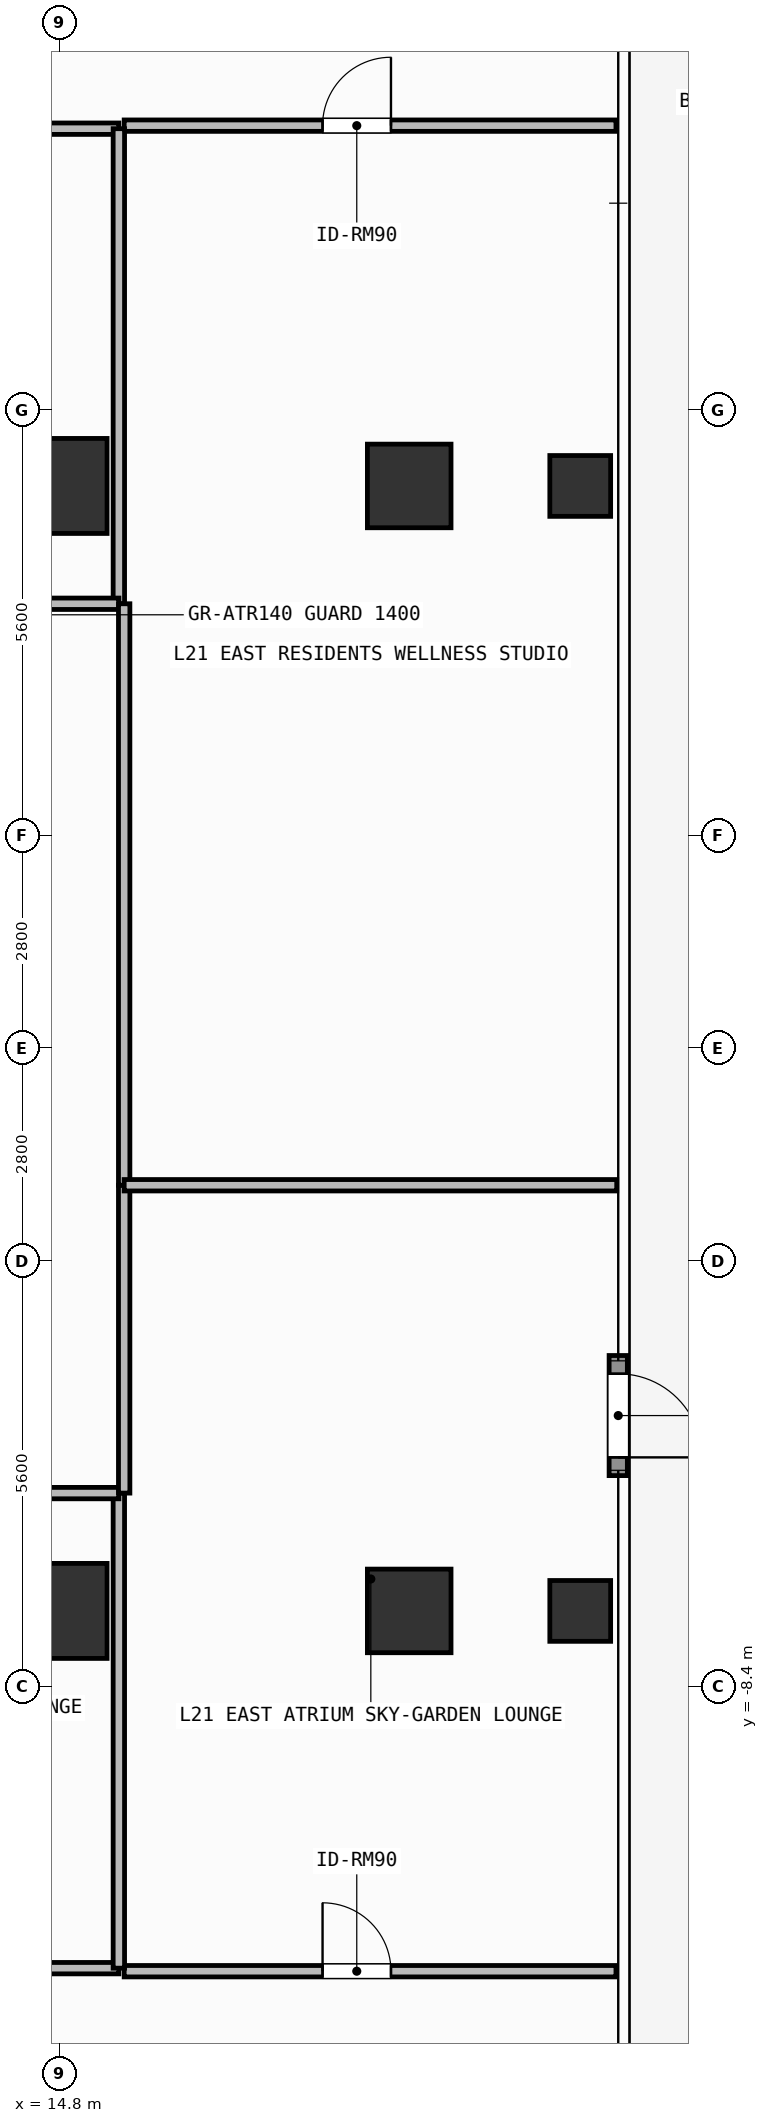
"""IFC4 building model, lengths in metres.
Left out: names, types, materials, properties, quantities, classifications, styles, units other than length and angle.
Written with IfcOpenShell. Run it as: python <this file> out.ifc"""

import sys

from ifc_helpers import new_model, si_unit, direction, frame, frame_2d, origin, origin_2d, place, context, subcontext, project, spatial, rectangle, hollow_rectangle, extrude, element, fill, save


model = new_model("IFC4")
c1 = context("Model", 3, precision=1e-05, world=origin(), true_north=direction((0.0, 1.0)))
c2 = subcontext(c1, "Body", "Model", "MODEL_VIEW")
j1 = project(units=[si_unit("LENGTHUNIT", "METRE"), si_unit("PLANEANGLEUNIT", "RADIAN")], contexts=[c1])
p1 = place(None, origin())
s1 = spatial("IfcSite", under=j1, at=p1, CompositionType="ELEMENT")
p2 = place(p1, origin())
s2 = spatial("IfcBuilding", under=s1, at=p2, CompositionType="ELEMENT")
p3 = place(p2, frame((0.0, 0.0, 85.2)))
s3 = spatial("IfcBuildingStorey", under=s2, at=p3, CompositionType="ELEMENT", Elevation=85.2)
for number, where, z_axis, x_axis in (
    (1, (14.8, -7.4, 0.0), (0.0, 0.0, 1.0), (1.0, 0.0, 0.0)),
    (2, (14.8, 7.4, 0.0), (0.0, 0.0, 1.0), (1.0, 0.0, 0.0)),
):
    element("IfcColumn", number, at=place(p3, frame(where, z_axis=z_axis, x_axis=x_axis)), inside=s3, PredefinedType="COLUMN", context=c2, shape_type="SweptSolid", body=[
        extrude(rectangle(XDim=1.25, YDim=1.25, at=origin_2d()), origin(), (0.0, 0.0, 1.0), 3.9),
    ])
for number, where, z_axis, x_axis in (
    (3, (19.4, -7.4, 0.0), (0.0, 0.0, 1.0), (1.0, 0.0, 0.0)),
    (4, (19.4, 7.4, 0.0), (0.0, 0.0, 1.0), (1.0, 0.0, 0.0)),
):
    element("IfcColumn", number, at=place(p3, frame(where, z_axis=z_axis, x_axis=x_axis)), inside=s3, PredefinedType="COLUMN", context=c2, shape_type="SweptSolid", body=[
        extrude(rectangle(XDim=1.1, YDim=1.1, at=origin_2d()), origin(), (0.0, 0.0, 1.0), 3.9),
    ])
for number, where, z_axis, x_axis in (
    (5, (21.65, -7.4, 0.0), (0.0, 0.0, 1.0), (1.0, 0.0, 0.0)),
    (6, (21.65, 7.4, 0.0), (0.0, 0.0, 1.0), (1.0, 0.0, 0.0)),
):
    element("IfcColumn", number, at=place(p3, frame(where, z_axis=z_axis, x_axis=x_axis)), inside=s3, PredefinedType="COLUMN", context=c2, shape_type="SweptSolid", body=[
        extrude(hollow_rectangle(XDim=0.8, YDim=0.8, WallThickness=0.036, at=origin_2d()), origin(), (0.0, 0.0, 1.0), 3.9),
    ])
p4 = place(p3, frame((22.15, -4.04, 0.0), z_axis=(0.0, 0.0, 1.0), x_axis=(0.0, -1.0, 0.0)))
e7 = element("IfcWall", 7, at=p4, inside=s3, PredefinedType="SOLIDWALL", context=c2, shape_type="SweptSolid", body=[
    extrude(rectangle(XDim=1.58, YDim=0.24, at=frame_2d((0.79, 0.0))), origin(), (0.0, 0.0, 1.0), 3.68),
])
p5 = place(p4, frame((0.24, 0.0, 0.0)))
e8 = element("IfcOpeningElement", 8, at=p5, cuts=e7, PredefinedType="OPENING", context=c2, shape_type="SweptSolid", body=[
    extrude(rectangle(XDim=1.1, YDim=2.2, at=frame_2d((0.55, 1.1))), frame((0.0, 0.13, 0.0), z_axis=(0.0, -1.0, 0.0), x_axis=(1.0, 0.0, 0.0)), (0.0, 0.0, 1.0), 0.26),
])
p6 = place(p3, frame((10.1, -12.1, 0.0), z_axis=(0.0, 0.0, 1.0), x_axis=(1.0, 0.0, 0.0)))
e9 = element("IfcWall", 9, at=p6, inside=s3, PredefinedType="PARTITIONING", context=c2, shape_type="SweptSolid", body=[
    extrude(rectangle(XDim=5.48, YDim=0.15, at=frame_2d((2.74, 0.0))), origin(), (0.0, 0.0, 1.0), 3.68),
])
p7 = place(p6, frame((2.29, 0.0, 0.0)))
e10 = element("IfcOpeningElement", 10, at=p7, cuts=e9, PredefinedType="OPENING", context=c2, shape_type="SweptSolid", body=[
    extrude(rectangle(XDim=0.9, YDim=2.1, at=frame_2d((0.45, 1.05))), frame((0.0, 0.085, 0.0), z_axis=(0.0, -1.0, 0.0), x_axis=(1.0, 0.0, 0.0)), (0.0, 0.0, 1.0), 0.17),
])
p8 = place(p3, frame((8.36, 12.1, 0.0), z_axis=(0.0, 0.0, 1.0), x_axis=(1.0, 0.0, 0.0)))
e11 = element("IfcWall", 11, at=p8, inside=s3, PredefinedType="PARTITIONING", context=c2, shape_type="SweptSolid", body=[
    extrude(rectangle(XDim=7.22, YDim=0.15, at=frame_2d((3.61, 0.0))), origin(), (0.0, 0.0, 1.0), 3.68),
])
p9 = place(p8, frame((3.513, 0.0, 0.0)))
e12 = element("IfcOpeningElement", 12, at=p9, cuts=e11, PredefinedType="OPENING", context=c2, shape_type="SweptSolid", body=[
    extrude(rectangle(XDim=0.9, YDim=2.1, at=frame_2d((0.45, 1.05))), frame((0.0, 0.085, 0.0), z_axis=(0.0, -1.0, 0.0), x_axis=(1.0, 0.0, 0.0)), (0.0, 0.0, 1.0), 0.17),
])
p10 = place(p3, frame((15.65, -12.14, 0.0), z_axis=(0.0, 0.0, 1.0), x_axis=(1.0, 0.0, 0.0)))
e13 = element("IfcWall", 13, at=p10, inside=s3, PredefinedType="PARTITIONING", context=c2, shape_type="SweptSolid", body=[
    extrude(rectangle(XDim=6.47, YDim=0.15, at=frame_2d((3.235, 0.0))), origin(), (0.0, 0.0, 1.0), 3.68),
])
p11 = place(p10, frame((2.61, 0.0, 0.0)))
e14 = element("IfcOpeningElement", 14, at=p11, cuts=e13, PredefinedType="OPENING", context=c2, shape_type="SweptSolid", body=[
    extrude(rectangle(XDim=0.9, YDim=2.1, at=frame_2d((0.45, 1.05))), frame((0.0, 0.085, 0.0), z_axis=(0.0, -1.0, 0.0), x_axis=(1.0, 0.0, 0.0)), (0.0, 0.0, 1.0), 0.17),
])
p12 = place(p3, frame((15.65, 12.14, 0.0), z_axis=(0.0, 0.0, 1.0), x_axis=(1.0, 0.0, 0.0)))
e15 = element("IfcWall", 15, at=p12, inside=s3, PredefinedType="PARTITIONING", context=c2, shape_type="SweptSolid", body=[
    extrude(rectangle(XDim=6.47, YDim=0.15, at=frame_2d((3.235, 0.0))), origin(), (0.0, 0.0, 1.0), 3.68),
])
p13 = place(p12, frame((2.61, 0.0, 0.0)))
e16 = element("IfcOpeningElement", 16, at=p13, cuts=e15, PredefinedType="OPENING", context=c2, shape_type="SweptSolid", body=[
    extrude(rectangle(XDim=0.9, YDim=2.1, at=frame_2d((0.45, 1.05))), frame((0.0, 0.085, 0.0), z_axis=(0.0, -1.0, 0.0), x_axis=(1.0, 0.0, 0.0)), (0.0, 0.0, 1.0), 0.17),
])
p14 = place(p3, frame((15.58, -12.1, 0.0), z_axis=(0.0, 0.0, 1.0), x_axis=(0.0, 1.0, 0.0)))
e17 = element("IfcWall", 17, at=p14, inside=s3, PredefinedType="PARTITIONING", context=c2, shape_type="SweptSolid", body=[
    extrude(rectangle(XDim=6.25, YDim=0.15, at=frame_2d((3.125, 0.0))), origin(), (0.0, 0.0, 1.0), 3.68),
])
p15 = place(p3, frame((8.96, -5.85, 0.0), z_axis=(0.0, 0.0, 1.0), x_axis=(1.0, 0.0, 0.0)))
e18 = element("IfcWall", 18, at=p15, inside=s3, PredefinedType="PARTITIONING", context=c2, shape_type="SweptSolid", body=[
    extrude(rectangle(XDim=6.62, YDim=0.15, at=frame_2d((3.31, 0.0))), origin(), (0.0, 0.0, 1.0), 3.68),
])
p16 = place(p3, frame((15.58, 5.85, 0.0), z_axis=(0.0, 0.0, 1.0), x_axis=(0.0, 1.0, 0.0)))
e19 = element("IfcWall", 19, at=p16, inside=s3, PredefinedType="PARTITIONING", context=c2, shape_type="SweptSolid", body=[
    extrude(rectangle(XDim=6.25, YDim=0.15, at=frame_2d((3.125, 0.0))), origin(), (0.0, 0.0, 1.0), 3.68),
])
p17 = place(p3, frame((8.96, 5.85, 0.0), z_axis=(0.0, 0.0, 1.0), x_axis=(1.0, 0.0, 0.0)))
e20 = element("IfcWall", 20, at=p17, inside=s3, PredefinedType="PARTITIONING", context=c2, shape_type="SweptSolid", body=[
    extrude(rectangle(XDim=6.62, YDim=0.15, at=frame_2d((3.31, 0.0))), origin(), (0.0, 0.0, 1.0), 3.68),
])
p18 = place(p3, frame((15.65, -5.85, 0.0), z_axis=(0.0, 0.0, 1.0), x_axis=(0.0, 1.0, 0.0)))
e21 = element("IfcWall", 21, at=p18, inside=s3, PredefinedType="PARTITIONING", context=c2, shape_type="SweptSolid", body=[
    extrude(rectangle(XDim=4.05, YDim=0.15, at=frame_2d((2.025, 0.0))), origin(), (0.0, 0.0, 1.0), 3.68),
])
p19 = place(p3, frame((15.65, -1.8, 0.0), z_axis=(0.0, 0.0, 1.0), x_axis=(0.0, 1.0, 0.0)))
e22 = element("IfcWall", 22, at=p19, inside=s3, PredefinedType="PARTITIONING", context=c2, shape_type="SweptSolid", body=[
    extrude(rectangle(XDim=7.65, YDim=0.15, at=frame_2d((3.825, 0.0))), origin(), (0.0, 0.0, 1.0), 3.68),
])
p20 = place(p3, frame((15.65, -1.8, 0.0), z_axis=(0.0, 0.0, 1.0), x_axis=(1.0, 0.0, 0.0)))
e23 = element("IfcWall", 23, at=p20, inside=s3, PredefinedType="PARTITIONING", context=c2, shape_type="SweptSolid", body=[
    extrude(rectangle(XDim=6.48, YDim=0.15, at=frame_2d((3.24, 0.0))), origin(), (0.0, 0.0, 1.0), 3.68),
])
p21 = place(p5, origin())
e24 = element("IfcDoor", 24, at=p21, inside=s3, OperationType="SINGLE_SWING_RIGHT", PredefinedType="DOOR", context=c2, shape_type="SweptSolid", body=[
    extrude(rectangle(XDim=1.1, YDim=2.2, at=frame_2d((0.55, 1.1))), frame((0.0, 0.025, 0.0), z_axis=(0.0, -1.0, 0.0), x_axis=(1.0, 0.0, 0.0)), (0.0, 0.0, 1.0), 0.05),
])
fill(e8, e24)
p22 = place(p11, origin())
e25 = element("IfcDoor", 25, at=p22, inside=s3, OperationType="SINGLE_SWING_LEFT", PredefinedType="DOOR", context=c2, shape_type="SweptSolid", body=[
    extrude(rectangle(XDim=0.9, YDim=2.1, at=frame_2d((0.45, 1.05))), frame((0.0, 0.025, 0.0), z_axis=(0.0, -1.0, 0.0), x_axis=(1.0, 0.0, 0.0)), (0.0, 0.0, 1.0), 0.05),
])
fill(e14, e25)
p23 = place(p13, origin())
e26 = element("IfcDoor", 26, at=p23, inside=s3, OperationType="SINGLE_SWING_RIGHT", PredefinedType="DOOR", context=c2, shape_type="SweptSolid", body=[
    extrude(rectangle(XDim=0.9, YDim=2.1, at=frame_2d((0.45, 1.05))), frame((0.0, 0.025, 0.0), z_axis=(0.0, -1.0, 0.0), x_axis=(1.0, 0.0, 0.0)), (0.0, 0.0, 1.0), 0.05),
])
fill(e16, e26)
save(model, sys.argv[1])
